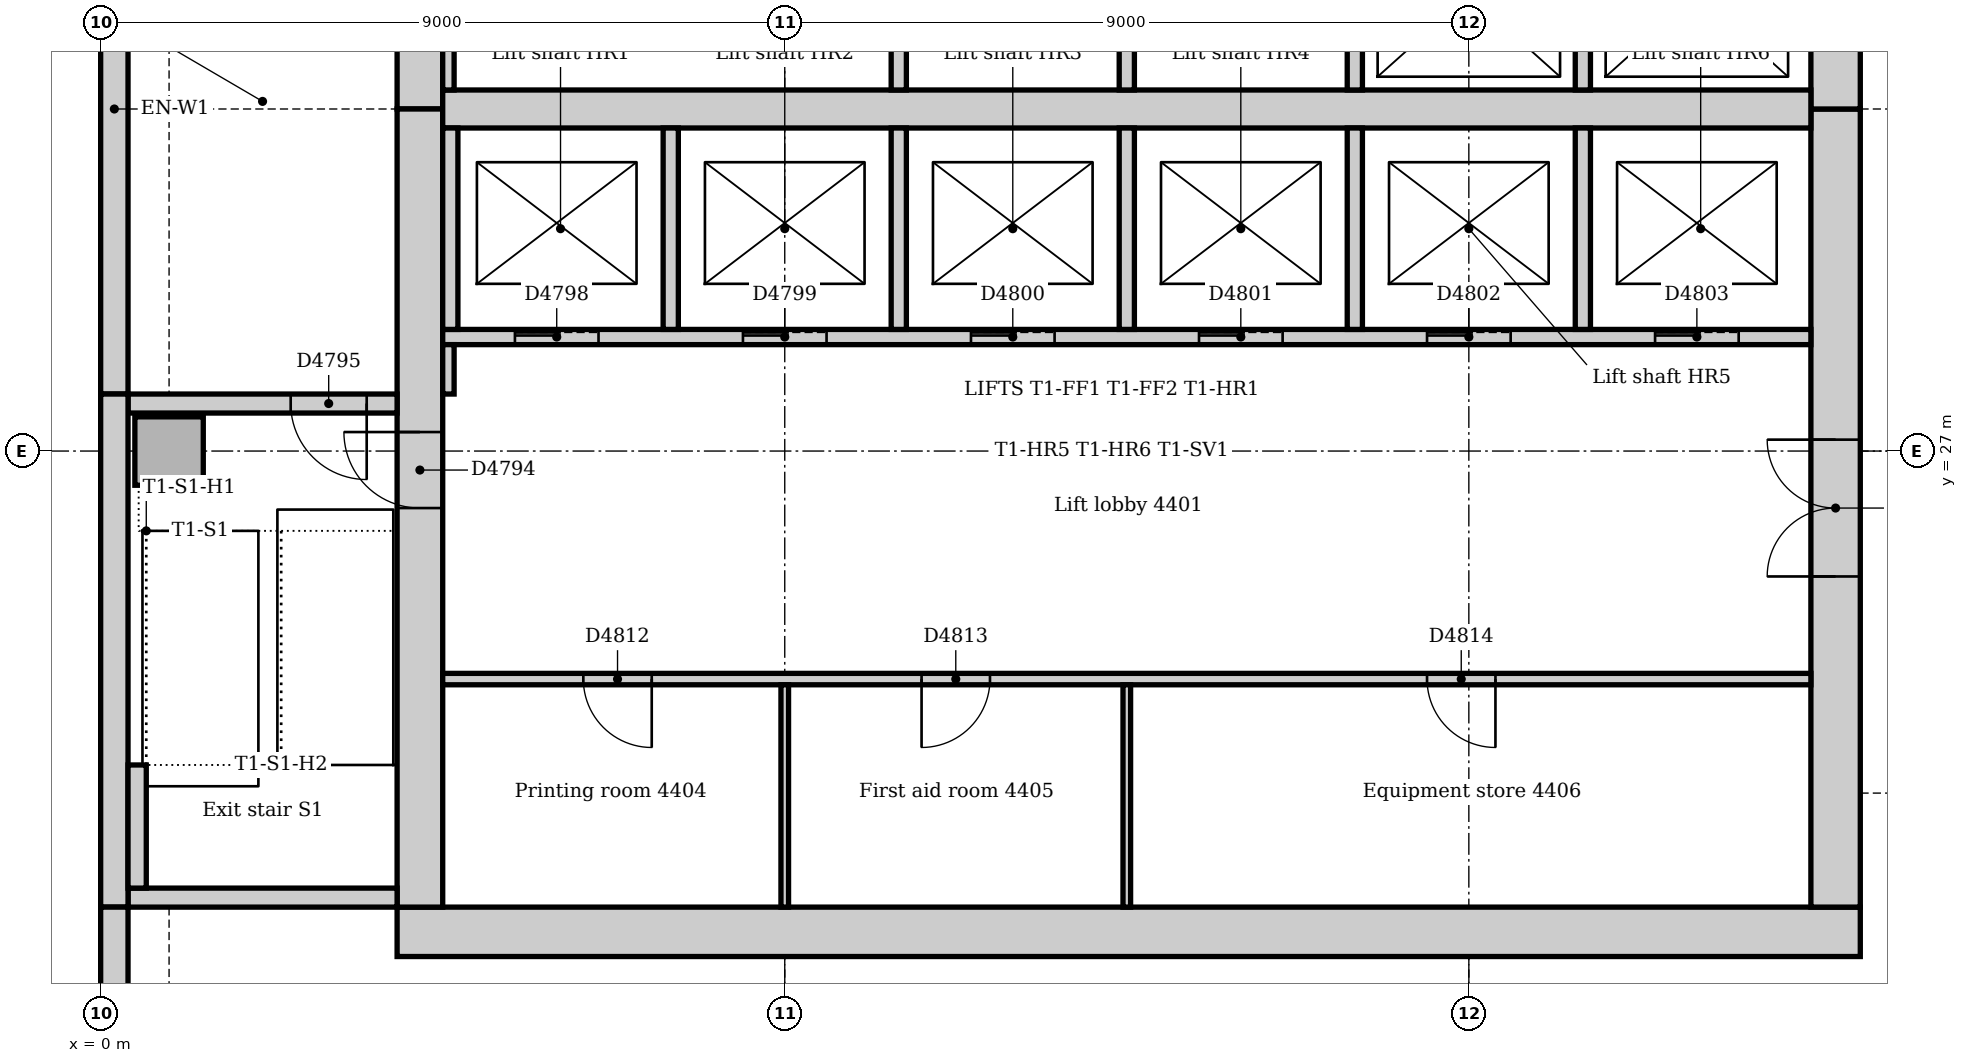
"""IFC4 building model, lengths in metres.
Left out: names, types, materials, properties, quantities, classifications, styles, units other than length and angle.
Written with IfcOpenShell. Run it as: python <this file> out.ifc"""

import sys

from ifc_helpers import new_model, si_unit, direction, frame, frame_2d, origin, origin_2d, place, context, subcontext, project, spatial, rectangle, extrude, element, fill, save


model = new_model("IFC4")
c1 = context("Model", 3, precision=1e-05, world=origin(), true_north=direction((0.0, 1.0)))
c2 = subcontext(c1, "Body", "Model", "MODEL_VIEW")
j1 = project(units=[si_unit("LENGTHUNIT", "METRE"), si_unit("PLANEANGLEUNIT", "RADIAN")], contexts=[c1])
p1 = place(None, origin())
s1 = spatial("IfcSite", under=j1, at=p1, CompositionType="ELEMENT")
p2 = place(p1, origin())
s2 = spatial("IfcBuilding", under=s1, at=p2, CompositionType="ELEMENT")
p3 = place(p2, frame((0.0, 0.0, 185.0)))
s3 = spatial("IfcBuildingStorey", under=s2, at=p3, CompositionType="ELEMENT", Elevation=185.0)
p4 = place(p3, frame((3.9, 20.675, 0.0), z_axis=(0.0, 0.0, 1.0), x_axis=(1.0, 0.0, 0.0)))
e1 = element("IfcWall", 1, at=p4, inside=s3, PredefinedType="SOLIDWALL", context=c2, shape_type="SweptSolid", body=[
    extrude(rectangle(XDim=19.25, YDim=0.65, at=frame_2d((9.625, 0.0))), origin(), (0.0, 0.0, 1.0), 4.0),
])
p5 = place(p3, frame((22.825, 21.0, 0.0), z_axis=(0.0, 0.0, 1.0), x_axis=(0.0, 1.0, 0.0)))
e2 = element("IfcWall", 2, at=p5, inside=s3, PredefinedType="SOLIDWALL", context=c2, shape_type="SweptSolid", body=[
    extrude(rectangle(XDim=10.5, YDim=0.65, at=frame_2d((5.25, 0.0))), origin(), (0.0, 0.0, 1.0), 4.0),
])
p6 = place(p5, frame((4.35, 0.0, 0.0)))
e3 = element("IfcOpeningElement", 3, at=p6, cuts=e2, PredefinedType="OPENING", context=c2, shape_type="SweptSolid", body=[
    extrude(rectangle(XDim=1.8, YDim=2.1, at=frame_2d((0.9, 1.05))), frame((0.0, 0.335, 0.0), z_axis=(0.0, -1.0, 0.0), x_axis=(1.0, 0.0, 0.0)), (0.0, 0.0, 1.0), 0.67),
])
p7 = place(p3, frame((22.825, 31.5, 0.0), z_axis=(0.0, 0.0, 1.0), x_axis=(0.0, 1.0, 0.0)))
e4 = element("IfcWall", 4, at=p7, inside=s3, PredefinedType="SOLIDWALL", context=c2, shape_type="SweptSolid", body=[
    extrude(rectangle(XDim=10.5, YDim=0.65, at=frame_2d((5.25, 0.0))), origin(), (0.0, 0.0, 1.0), 4.0),
])
p8 = place(p7, frame((3.15, 0.0, 0.0)))
e5 = element("IfcOpeningElement", 5, at=p8, cuts=e4, PredefinedType="OPENING", context=c2, shape_type="SweptSolid", body=[
    extrude(rectangle(XDim=1.0, YDim=2.1, at=frame_2d((0.5, 1.05))), frame((0.0, 0.335, 0.0), z_axis=(0.0, -1.0, 0.0), x_axis=(1.0, 0.0, 0.0)), (0.0, 0.0, 1.0), 0.67),
])
p9 = place(p7, frame((5.2, 0.0, 0.0)))
e6 = element("IfcOpeningElement", 6, at=p9, cuts=e4, PredefinedType="OPENING", context=c2, shape_type="SweptSolid", body=[
    extrude(rectangle(XDim=1.0, YDim=2.1, at=frame_2d((0.5, 1.05))), frame((0.0, 0.335, 0.0), z_axis=(0.0, -1.0, 0.0), x_axis=(1.0, 0.0, 0.0)), (0.0, 0.0, 1.0), 0.67),
])
p10 = place(p3, frame((4.2, 42.0, 0.0), z_axis=(0.0, 0.0, 1.0), x_axis=(0.0, -1.0, 0.0)))
e7 = element("IfcWall", 7, at=p10, inside=s3, PredefinedType="SOLIDWALL", context=c2, shape_type="SweptSolid", body=[
    extrude(rectangle(XDim=10.5, YDim=0.6, at=frame_2d((5.25, 0.0))), origin(), (0.0, 0.0, 1.0), 4.0),
])
p11 = place(p10, frame((5.3, 0.0, 0.0)))
e8 = element("IfcOpeningElement", 8, at=p11, cuts=e7, PredefinedType="OPENING", context=c2, shape_type="SweptSolid", body=[
    extrude(rectangle(XDim=1.0, YDim=2.1, at=frame_2d((0.5, 1.05))), frame((0.0, 0.31, 0.0), z_axis=(0.0, -1.0, 0.0), x_axis=(1.0, 0.0, 0.0)), (0.0, 0.0, 1.0), 0.62),
])
p12 = place(p3, frame((4.2, 31.5, 0.0), z_axis=(0.0, 0.0, 1.0), x_axis=(0.0, -1.0, 0.0)))
e9 = element("IfcWall", 9, at=p12, inside=s3, PredefinedType="SOLIDWALL", context=c2, shape_type="SweptSolid", body=[
    extrude(rectangle(XDim=10.5, YDim=0.6, at=frame_2d((5.25, 0.0))), origin(), (0.0, 0.0, 1.0), 4.0),
])
p13 = place(p12, frame((4.25, 0.0, 0.0)))
e10 = element("IfcOpeningElement", 10, at=p13, cuts=e9, PredefinedType="OPENING", context=c2, shape_type="SweptSolid", body=[
    extrude(rectangle(XDim=1.0, YDim=2.1, at=frame_2d((0.5, 1.05))), frame((0.0, 0.31, 0.0), z_axis=(0.0, -1.0, 0.0), x_axis=(1.0, 0.0, 0.0)), (0.0, 0.0, 1.0), 0.62),
])
p14 = place(p3, frame((4.5, 31.5, 0.0), z_axis=(0.0, 0.0, 1.0), x_axis=(1.0, 0.0, 0.0)))
e11 = element("IfcWall", 11, at=p14, inside=s3, PredefinedType="SOLIDWALL", context=c2, shape_type="SweptSolid", body=[
    extrude(rectangle(XDim=18.0, YDim=0.5, at=frame_2d((9.0, 0.0))), origin(), (0.0, 0.0, 1.0), 4.0),
])
p15 = place(p3, frame((0.36, 21.125, 0.0), z_axis=(0.0, 0.0, 1.0), x_axis=(1.0, 0.0, 0.0)))
e12 = element("IfcWall", 12, at=p15, inside=s3, PredefinedType="SOLIDWALL", context=c2, shape_type="SweptSolid", body=[
    extrude(rectangle(XDim=3.54, YDim=0.25, at=frame_2d((1.77, 0.0))), origin(), (0.0, 0.0, 1.0), 4.0),
])
p16 = place(p3, frame((3.9, 27.625, 0.0), z_axis=(0.0, 0.0, 1.0), x_axis=(-1.0, 0.0, 0.0)))
e13 = element("IfcWall", 13, at=p16, inside=s3, PredefinedType="SOLIDWALL", context=c2, shape_type="SweptSolid", body=[
    extrude(rectangle(XDim=3.54, YDim=0.25, at=frame_2d((1.77, 0.0))), origin(), (0.0, 0.0, 1.0), 4.0),
])
p17 = place(p16, frame((0.4, 0.0, 0.0)))
e14 = element("IfcOpeningElement", 14, at=p17, cuts=e13, PredefinedType="OPENING", context=c2, shape_type="SweptSolid", body=[
    extrude(rectangle(XDim=1.0, YDim=2.1, at=frame_2d((0.5, 1.05))), frame((0.0, 0.135, 0.0), z_axis=(0.0, -1.0, 0.0), x_axis=(1.0, 0.0, 0.0)), (0.0, 0.0, 1.0), 0.27),
])
p18 = place(p3, frame((0.9, 27.0, 0.0), z_axis=(0.0, 0.0, 1.0), x_axis=(1.0, 0.0, 0.0)))
e15 = element("IfcColumn", 15, at=p18, inside=s3, PredefinedType="COLUMN", context=c2, shape_type="SweptSolid", body=[
    extrude(rectangle(XDim=0.9, YDim=0.9, at=origin_2d()), origin(), (0.0, 0.0, 1.0), 4.0),
])
p19 = place(p3, frame((0.18, 35.25, 0.0), z_axis=(0.0, 0.0, 1.0), x_axis=(0.0, -1.0, 0.0)))
e16 = element("IfcWall", 16, at=p19, inside=s3, PredefinedType="STANDARD", context=c2, shape_type="SweptSolid", body=[
    extrude(rectangle(XDim=7.5, YDim=0.36, at=frame_2d((3.75, 0.0))), origin(), (0.0, 0.0, 1.0), 3.85),
])
p20 = place(p3, frame((0.18, 27.75, 0.0), z_axis=(0.0, 0.0, 1.0), x_axis=(0.0, -1.0, 0.0)))
e17 = element("IfcWall", 17, at=p20, inside=s3, PredefinedType="STANDARD", context=c2, shape_type="SweptSolid", body=[
    extrude(rectangle(XDim=6.75, YDim=0.36, at=frame_2d((3.375, 0.0))), origin(), (0.0, 0.0, 1.0), 3.85),
])
p21 = place(p3, frame((0.18, 21.0, 0.0), z_axis=(0.0, 0.0, 1.0), x_axis=(0.0, -1.0, 0.0)))
e18 = element("IfcWall", 18, at=p21, inside=s3, PredefinedType="STANDARD", context=c2, shape_type="SweptSolid", body=[
    extrude(rectangle(XDim=7.757, YDim=0.36, at=frame_2d((3.879, 0.0))), origin(), (0.0, 0.0, 1.0), 3.85),
])
p22 = place(p21, frame((1.35, 0.0, 0.9)))
e19 = element("IfcOpeningElement", 19, at=p22, cuts=e18, PredefinedType="OPENING", context=c2, shape_type="SweptSolid", body=[
    extrude(rectangle(XDim=3.3, YDim=1.6, at=frame_2d((1.65, 0.8))), frame((0.0, 0.19, 0.0), z_axis=(0.0, -1.0, 0.0), x_axis=(1.0, 0.0, 0.0)), (0.0, 0.0, 1.0), 0.38),
])
p23 = place(p3, frame((0.48, 21.25, 0.0), z_axis=(0.0, 0.0, 1.0), x_axis=(0.0, 1.0, 0.0)))
e20 = element("IfcWall", 20, at=p23, inside=s3, PredefinedType="STANDARD", context=c2, shape_type="SweptSolid", body=[
    extrude(rectangle(XDim=1.62, YDim=0.24, at=frame_2d((0.81, 0.0))), origin(), (0.0, 0.0, 1.0), 4.0),
])
p24 = place(p3, frame((4.5, 28.5, 0.0), z_axis=(0.0, 0.0, 1.0), x_axis=(1.0, 0.0, 0.0)))
e21 = element("IfcWall", 21, at=p24, inside=s3, PredefinedType="PARTITIONING", context=c2, shape_type="SweptSolid", body=[
    extrude(rectangle(XDim=18.0, YDim=0.2, at=frame_2d((9.0, 0.0))), origin(), (0.0, 0.0, 1.0), 3.85),
])
p25 = place(p24, frame((0.95, 0.0, 0.0)))
e22 = element("IfcOpeningElement", 22, at=p25, cuts=e21, PredefinedType="OPENING", context=c2, shape_type="SweptSolid", body=[
    extrude(rectangle(XDim=1.1, YDim=2.1, at=frame_2d((0.55, 1.05))), frame((0.0, 0.11, 0.0), z_axis=(0.0, -1.0, 0.0), x_axis=(1.0, 0.0, 0.0)), (0.0, 0.0, 1.0), 0.22),
])
p26 = place(p24, frame((3.95, 0.0, 0.0)))
e23 = element("IfcOpeningElement", 23, at=p26, cuts=e21, PredefinedType="OPENING", context=c2, shape_type="SweptSolid", body=[
    extrude(rectangle(XDim=1.1, YDim=2.1, at=frame_2d((0.55, 1.05))), frame((0.0, 0.11, 0.0), z_axis=(0.0, -1.0, 0.0), x_axis=(1.0, 0.0, 0.0)), (0.0, 0.0, 1.0), 0.22),
])
p27 = place(p24, frame((6.95, 0.0, 0.0)))
e24 = element("IfcOpeningElement", 24, at=p27, cuts=e21, PredefinedType="OPENING", context=c2, shape_type="SweptSolid", body=[
    extrude(rectangle(XDim=1.1, YDim=2.1, at=frame_2d((0.55, 1.05))), frame((0.0, 0.11, 0.0), z_axis=(0.0, -1.0, 0.0), x_axis=(1.0, 0.0, 0.0)), (0.0, 0.0, 1.0), 0.22),
])
p28 = place(p24, frame((9.95, 0.0, 0.0)))
e25 = element("IfcOpeningElement", 25, at=p28, cuts=e21, PredefinedType="OPENING", context=c2, shape_type="SweptSolid", body=[
    extrude(rectangle(XDim=1.1, YDim=2.1, at=frame_2d((0.55, 1.05))), frame((0.0, 0.11, 0.0), z_axis=(0.0, -1.0, 0.0), x_axis=(1.0, 0.0, 0.0)), (0.0, 0.0, 1.0), 0.22),
])
p29 = place(p24, frame((12.95, 0.0, 0.0)))
e26 = element("IfcOpeningElement", 26, at=p29, cuts=e21, PredefinedType="OPENING", context=c2, shape_type="SweptSolid", body=[
    extrude(rectangle(XDim=1.1, YDim=2.1, at=frame_2d((0.55, 1.05))), frame((0.0, 0.11, 0.0), z_axis=(0.0, -1.0, 0.0), x_axis=(1.0, 0.0, 0.0)), (0.0, 0.0, 1.0), 0.22),
])
p30 = place(p24, frame((15.95, 0.0, 0.0)))
e27 = element("IfcOpeningElement", 27, at=p30, cuts=e21, PredefinedType="OPENING", context=c2, shape_type="SweptSolid", body=[
    extrude(rectangle(XDim=1.1, YDim=2.1, at=frame_2d((0.55, 1.05))), frame((0.0, 0.11, 0.0), z_axis=(0.0, -1.0, 0.0), x_axis=(1.0, 0.0, 0.0)), (0.0, 0.0, 1.0), 0.22),
])
for number, where, z_axis, x_axis in (
    (28, (10.5, 28.6, 0.0), (0.0, 0.0, 1.0), (0.0, 1.0, 0.0)),
    (29, (10.5, 31.75, 0.0), (0.0, 0.0, 1.0), (0.0, 1.0, 0.0)),
    (30, (13.5, 28.6, 0.0), (0.0, 0.0, 1.0), (0.0, 1.0, 0.0)),
    (31, (13.5, 31.75, 0.0), (0.0, 0.0, 1.0), (0.0, 1.0, 0.0)),
    (32, (16.5, 28.6, 0.0), (0.0, 0.0, 1.0), (0.0, 1.0, 0.0)),
    (33, (16.5, 31.75, 0.0), (0.0, 0.0, 1.0), (0.0, 1.0, 0.0)),
    (34, (19.5, 28.6, 0.0), (0.0, 0.0, 1.0), (0.0, 1.0, 0.0)),
    (35, (19.5, 31.75, 0.0), (0.0, 0.0, 1.0), (0.0, 1.0, 0.0)),
    (36, (4.6, 28.6, 0.0), (0.0, 0.0, 1.0), (0.0, 1.0, 0.0)),
    (37, (7.5, 28.6, 0.0), (0.0, 0.0, 1.0), (0.0, 1.0, 0.0)),
):
    element("IfcWall", number, at=place(p3, frame(where, z_axis=z_axis, x_axis=x_axis)), inside=s3, PredefinedType="PARTITIONING", context=c2, shape_type="SweptSolid", body=[
        extrude(rectangle(XDim=2.65, YDim=0.2, at=frame_2d((1.325, 0.0))), origin(), (0.0, 0.0, 1.0), 3.85),
    ])
p31 = place(p3, frame((4.5, 24.0, 0.0), z_axis=(0.0, 0.0, 1.0), x_axis=(1.0, 0.0, 0.0)))
e38 = element("IfcWall", 38, at=p31, inside=s3, PredefinedType="PARTITIONING", context=c2, shape_type="SweptSolid", body=[
    extrude(rectangle(XDim=18.0, YDim=0.15, at=frame_2d((9.0, 0.0))), origin(), (0.0, 0.0, 1.0), 3.85),
])
p32 = place(p31, frame((1.85, 0.0, 0.0)))
e39 = element("IfcOpeningElement", 39, at=p32, cuts=e38, PredefinedType="OPENING", context=c2, shape_type="SweptSolid", body=[
    extrude(rectangle(XDim=0.9, YDim=2.1, at=frame_2d((0.45, 1.05))), frame((0.0, 0.085, 0.0), z_axis=(0.0, -1.0, 0.0), x_axis=(1.0, 0.0, 0.0)), (0.0, 0.0, 1.0), 0.17),
])
p33 = place(p31, frame((6.3, 0.0, 0.0)))
e40 = element("IfcOpeningElement", 40, at=p33, cuts=e38, PredefinedType="OPENING", context=c2, shape_type="SweptSolid", body=[
    extrude(rectangle(XDim=0.9, YDim=2.1, at=frame_2d((0.45, 1.05))), frame((0.0, 0.085, 0.0), z_axis=(0.0, -1.0, 0.0), x_axis=(1.0, 0.0, 0.0)), (0.0, 0.0, 1.0), 0.17),
])
p34 = place(p31, frame((12.95, 0.0, 0.0)))
e41 = element("IfcOpeningElement", 41, at=p34, cuts=e38, PredefinedType="OPENING", context=c2, shape_type="SweptSolid", body=[
    extrude(rectangle(XDim=0.9, YDim=2.1, at=frame_2d((0.45, 1.05))), frame((0.0, 0.085, 0.0), z_axis=(0.0, -1.0, 0.0), x_axis=(1.0, 0.0, 0.0)), (0.0, 0.0, 1.0), 0.17),
])
p35 = place(p3, frame((4.575, 31.75, 0.0), z_axis=(0.0, 0.0, 1.0), x_axis=(0.0, 1.0, 0.0)))
e42 = element("IfcWall", 42, at=p35, inside=s3, PredefinedType="PARTITIONING", context=c2, shape_type="SweptSolid", body=[
    extrude(rectangle(XDim=2.675, YDim=0.15, at=frame_2d((1.337, 0.0))), origin(), (0.0, 0.0, 1.0), 3.85),
])
p36 = place(p3, frame((4.575, 27.75, 0.0), z_axis=(0.0, 0.0, 1.0), x_axis=(0.0, 1.0, 0.0)))
e43 = element("IfcWall", 43, at=p36, inside=s3, PredefinedType="PARTITIONING", context=c2, shape_type="SweptSolid", body=[
    extrude(rectangle(XDim=0.65, YDim=0.15, at=frame_2d((0.325, 0.0))), origin(), (0.0, 0.0, 1.0), 3.85),
])
for number, where, z_axis, x_axis in (
    (44, (9.0, 21.0, 0.0), (0.0, 0.0, 1.0), (0.0, 1.0, 0.0)),
    (45, (13.5, 21.0, 0.0), (0.0, 0.0, 1.0), (0.0, 1.0, 0.0)),
):
    element("IfcWall", number, at=place(p3, frame(where, z_axis=z_axis, x_axis=x_axis)), inside=s3, PredefinedType="PARTITIONING", context=c2, shape_type="SweptSolid", body=[
        extrude(rectangle(XDim=2.925, YDim=0.1, at=frame_2d((1.462, 0.0))), origin(), (0.0, 0.0, 1.0), 3.85),
    ])
p37 = place(p13, frame((1.0, 0.0, 0.0), z_axis=(0.0, 0.0, 1.0), x_axis=(-1.0, 0.0, 0.0)))
e46 = element("IfcDoor", 46, at=p37, inside=s3, OperationType="SINGLE_SWING_RIGHT", PredefinedType="DOOR", context=c2, shape_type="SweptSolid", body=[
    extrude(rectangle(XDim=1.0, YDim=2.1, at=frame_2d((0.5, 1.05))), frame((0.0, 0.025, 0.0), z_axis=(0.0, -1.0, 0.0), x_axis=(1.0, 0.0, 0.0)), (0.0, 0.0, 1.0), 0.05),
])
fill(e10, e46)
p38 = place(p17, origin())
e47 = element("IfcDoor", 47, at=p38, inside=s3, OperationType="SINGLE_SWING_LEFT", PredefinedType="DOOR", context=c2, shape_type="SweptSolid", body=[
    extrude(rectangle(XDim=1.0, YDim=2.1, at=frame_2d((0.5, 1.05))), frame((0.0, 0.025, 0.0), z_axis=(0.0, -1.0, 0.0), x_axis=(1.0, 0.0, 0.0)), (0.0, 0.0, 1.0), 0.05),
])
fill(e14, e47)
p39 = place(p25, origin())
e48 = element("IfcDoor", 48, at=p39, inside=s3, OperationType="SLIDING_TO_LEFT", PredefinedType="DOOR", context=c2, shape_type="SweptSolid", body=[
    extrude(rectangle(XDim=1.1, YDim=2.1, at=frame_2d((0.55, 1.05))), frame((0.0, 0.025, 0.0), z_axis=(0.0, -1.0, 0.0), x_axis=(1.0, 0.0, 0.0)), (0.0, 0.0, 1.0), 0.05),
])
fill(e22, e48)
p40 = place(p26, origin())
e49 = element("IfcDoor", 49, at=p40, inside=s3, OperationType="SLIDING_TO_LEFT", PredefinedType="DOOR", context=c2, shape_type="SweptSolid", body=[
    extrude(rectangle(XDim=1.1, YDim=2.1, at=frame_2d((0.55, 1.05))), frame((0.0, 0.025, 0.0), z_axis=(0.0, -1.0, 0.0), x_axis=(1.0, 0.0, 0.0)), (0.0, 0.0, 1.0), 0.05),
])
fill(e23, e49)
p41 = place(p27, origin())
e50 = element("IfcDoor", 50, at=p41, inside=s3, OperationType="SLIDING_TO_LEFT", PredefinedType="DOOR", context=c2, shape_type="SweptSolid", body=[
    extrude(rectangle(XDim=1.1, YDim=2.1, at=frame_2d((0.55, 1.05))), frame((0.0, 0.025, 0.0), z_axis=(0.0, -1.0, 0.0), x_axis=(1.0, 0.0, 0.0)), (0.0, 0.0, 1.0), 0.05),
])
fill(e24, e50)
p42 = place(p28, origin())
e51 = element("IfcDoor", 51, at=p42, inside=s3, OperationType="SLIDING_TO_LEFT", PredefinedType="DOOR", context=c2, shape_type="SweptSolid", body=[
    extrude(rectangle(XDim=1.1, YDim=2.1, at=frame_2d((0.55, 1.05))), frame((0.0, 0.025, 0.0), z_axis=(0.0, -1.0, 0.0), x_axis=(1.0, 0.0, 0.0)), (0.0, 0.0, 1.0), 0.05),
])
fill(e25, e51)
p43 = place(p29, origin())
e52 = element("IfcDoor", 52, at=p43, inside=s3, OperationType="SLIDING_TO_LEFT", PredefinedType="DOOR", context=c2, shape_type="SweptSolid", body=[
    extrude(rectangle(XDim=1.1, YDim=2.1, at=frame_2d((0.55, 1.05))), frame((0.0, 0.025, 0.0), z_axis=(0.0, -1.0, 0.0), x_axis=(1.0, 0.0, 0.0)), (0.0, 0.0, 1.0), 0.05),
])
fill(e26, e52)
p44 = place(p30, origin())
e53 = element("IfcDoor", 53, at=p44, inside=s3, OperationType="SLIDING_TO_LEFT", PredefinedType="DOOR", context=c2, shape_type="SweptSolid", body=[
    extrude(rectangle(XDim=1.1, YDim=2.1, at=frame_2d((0.55, 1.05))), frame((0.0, 0.025, 0.0), z_axis=(0.0, -1.0, 0.0), x_axis=(1.0, 0.0, 0.0)), (0.0, 0.0, 1.0), 0.05),
])
fill(e27, e53)
p45 = place(p6, origin())
e54 = element("IfcDoor", 54, at=p45, inside=s3, OperationType="DOUBLE_DOOR_DOUBLE_SWING", PredefinedType="DOOR", context=c2, shape_type="SweptSolid", body=[
    extrude(rectangle(XDim=1.8, YDim=2.1, at=frame_2d((0.9, 1.05))), frame((0.0, 0.025, 0.0), z_axis=(0.0, -1.0, 0.0), x_axis=(1.0, 0.0, 0.0)), (0.0, 0.0, 1.0), 0.05),
])
fill(e3, e54)
p46 = place(p32, frame((0.9, 0.0, 0.0), z_axis=(0.0, 0.0, 1.0), x_axis=(-1.0, 0.0, 0.0)))
e55 = element("IfcDoor", 55, at=p46, inside=s3, OperationType="SINGLE_SWING_LEFT", PredefinedType="DOOR", context=c2, shape_type="SweptSolid", body=[
    extrude(rectangle(XDim=0.9, YDim=2.1, at=frame_2d((0.45, 1.05))), frame((0.0, 0.025, 0.0), z_axis=(0.0, -1.0, 0.0), x_axis=(1.0, 0.0, 0.0)), (0.0, 0.0, 1.0), 0.05),
])
fill(e39, e55)
p47 = place(p33, frame((0.9, 0.0, 0.0), z_axis=(0.0, 0.0, 1.0), x_axis=(-1.0, 0.0, 0.0)))
e56 = element("IfcDoor", 56, at=p47, inside=s3, OperationType="SINGLE_SWING_RIGHT", PredefinedType="DOOR", context=c2, shape_type="SweptSolid", body=[
    extrude(rectangle(XDim=0.9, YDim=2.1, at=frame_2d((0.45, 1.05))), frame((0.0, 0.025, 0.0), z_axis=(0.0, -1.0, 0.0), x_axis=(1.0, 0.0, 0.0)), (0.0, 0.0, 1.0), 0.05),
])
fill(e40, e56)
p48 = place(p34, frame((0.9, 0.0, 0.0), z_axis=(0.0, 0.0, 1.0), x_axis=(-1.0, 0.0, 0.0)))
e57 = element("IfcDoor", 57, at=p48, inside=s3, OperationType="SINGLE_SWING_LEFT", PredefinedType="DOOR", context=c2, shape_type="SweptSolid", body=[
    extrude(rectangle(XDim=0.9, YDim=2.1, at=frame_2d((0.45, 1.05))), frame((0.0, 0.025, 0.0), z_axis=(0.0, -1.0, 0.0), x_axis=(1.0, 0.0, 0.0)), (0.0, 0.0, 1.0), 0.05),
])
fill(e41, e57)
save(model, sys.argv[1])
